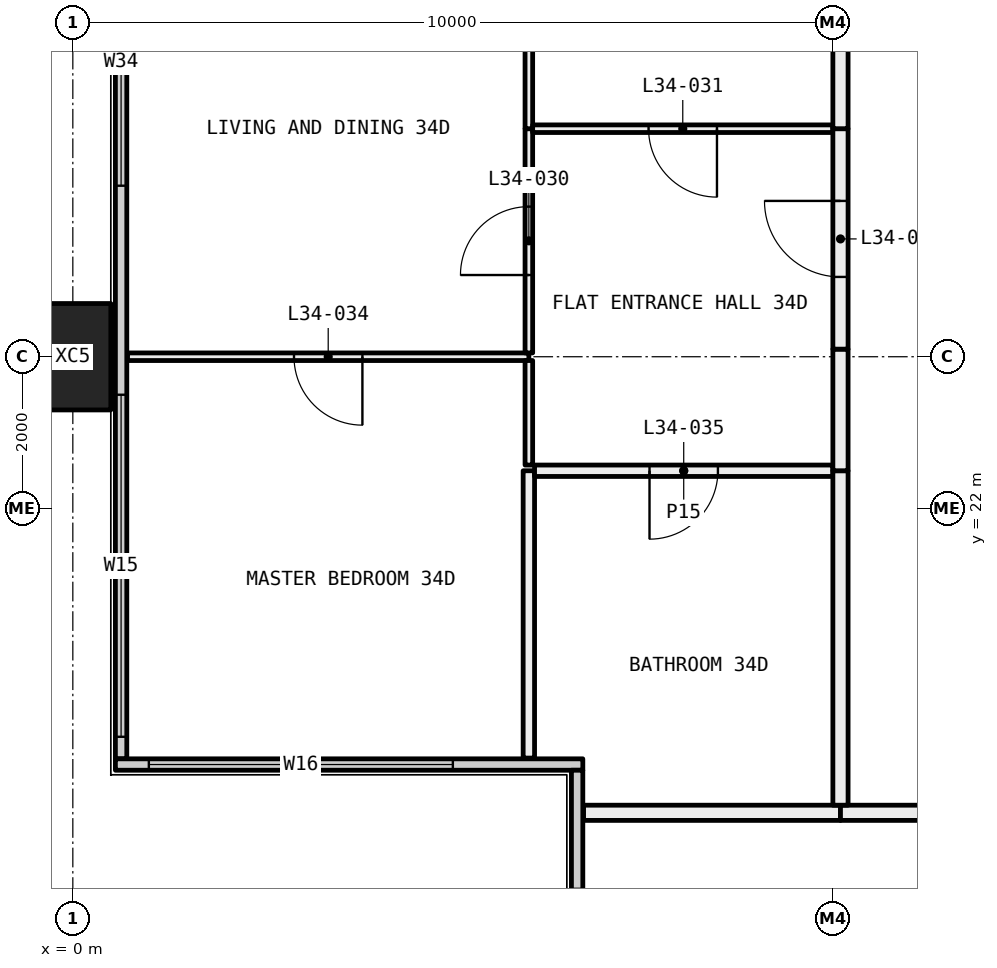
"""IFC4 building model, lengths in metres.
Left out: names, types, materials, properties, quantities, classifications, styles, units other than length and angle.
Written with IfcOpenShell. Run it as: python <this file> out.ifc"""

import sys

from ifc_helpers import new_model, si_unit, direction, frame, frame_2d, origin, origin_2d, place, context, subcontext, project, spatial, rectangle, hollow_rectangle, extrude, element, fill, save


model = new_model("IFC4")
c1 = context("Model", 3, precision=1e-05, world=origin(), true_north=direction((0.0, 1.0)))
c2 = subcontext(c1, "Body", "Model", "MODEL_VIEW")
j1 = project(units=[si_unit("LENGTHUNIT", "METRE"), si_unit("PLANEANGLEUNIT", "RADIAN")], contexts=[c1])
p1 = place(None, origin())
s1 = spatial("IfcSite", under=j1, at=p1, CompositionType="ELEMENT")
p2 = place(p1, origin())
s2 = spatial("IfcBuilding", under=s1, at=p2, CompositionType="ELEMENT")
p3 = place(p2, frame((0.0, 0.0, 131.1)))
s3 = spatial("IfcBuildingStorey", under=s2, at=p3, CompositionType="ELEMENT", Elevation=131.1)
p4 = place(p3, frame((0.0, 24.0, -0.4), z_axis=(0.0, 0.0, 1.0), x_axis=(0.0, 1.0, 0.0)))
e1 = element("IfcColumn", 1, at=p4, inside=s3, PredefinedType="COLUMN", context=c2, shape_type="SweptSolid", body=[
    extrude(hollow_rectangle(XDim=1.4, YDim=1.0, WallThickness=0.055, at=origin_2d()), origin(), (0.0, 0.0, 1.0), 3.45),
])
p5 = place(p3, frame((0.635, 18.71, 0.0), z_axis=(0.0, 0.0, 1.0), x_axis=(0.0, 1.0, 0.0)))
e2 = element("IfcWall", 2, at=p5, inside=s3, PredefinedType="ELEMENTEDWALL", context=c2, shape_type="SweptSolid", body=[
    extrude(rectangle(XDim=22.58, YDim=0.15, at=frame_2d((11.29, 0.0))), origin(), (0.0, 0.0, 1.0), 3.05),
])
p6 = place(p5, frame((0.29, 0.0, 0.45)))
e3 = element("IfcOpeningElement", 3, at=p6, cuts=e2, PredefinedType="OPENING", context=c2, shape_type="SweptSolid", body=[
    extrude(rectangle(XDim=4.5, YDim=2.55, at=frame_2d((2.25, 1.275))), frame((0.0, 0.085, 0.0), z_axis=(0.0, -1.0, 0.0), x_axis=(1.0, 0.0, 0.0)), (0.0, 0.0, 1.0), 0.17),
])
p7 = place(p5, frame((7.54, 0.0, 0.45)))
e4 = element("IfcOpeningElement", 4, at=p7, cuts=e2, PredefinedType="OPENING", context=c2, shape_type="SweptSolid", body=[
    extrude(rectangle(XDim=3.25, YDim=2.55, at=frame_2d((1.625, 1.275))), frame((0.0, 0.085, 0.0), z_axis=(0.0, -1.0, 0.0), x_axis=(1.0, 0.0, 0.0)), (0.0, 0.0, 1.0), 0.17),
])
p8 = place(p5, frame((11.79, 0.0, 0.45)))
e5 = element("IfcOpeningElement", 5, at=p8, cuts=e2, PredefinedType="OPENING", context=c2, shape_type="SweptSolid", body=[
    extrude(rectangle(XDim=2.0, YDim=2.55, at=frame_2d((1.0, 1.275))), frame((0.0, 0.085, 0.0), z_axis=(0.0, -1.0, 0.0), x_axis=(1.0, 0.0, 0.0)), (0.0, 0.0, 1.0), 0.17),
])
p9 = place(p5, frame((17.79, 0.0, 0.45)))
e6 = element("IfcOpeningElement", 6, at=p9, cuts=e2, PredefinedType="OPENING", context=c2, shape_type="SweptSolid", body=[
    extrude(rectangle(XDim=4.5, YDim=2.55, at=frame_2d((2.25, 1.275))), frame((0.0, 0.085, 0.0), z_axis=(0.0, -1.0, 0.0), x_axis=(1.0, 0.0, 0.0)), (0.0, 0.0, 1.0), 0.17),
])
p10 = place(p3, frame((0.56, 18.635, 0.0), z_axis=(0.0, 0.0, 1.0), x_axis=(1.0, 0.0, 0.0)))
e7 = element("IfcWall", 7, at=p10, inside=s3, PredefinedType="ELEMENTEDWALL", context=c2, shape_type="SweptSolid", body=[
    extrude(rectangle(XDim=6.15, YDim=0.15, at=frame_2d((3.075, 0.0))), origin(), (0.0, 0.0, 1.0), 3.05),
])
p11 = place(p10, frame((0.44, 0.0, 0.45)))
e8 = element("IfcOpeningElement", 8, at=p11, cuts=e7, PredefinedType="OPENING", context=c2, shape_type="SweptSolid", body=[
    extrude(rectangle(XDim=4.0, YDim=2.55, at=frame_2d((2.0, 1.275))), frame((0.0, 0.085, 0.0), z_axis=(0.0, -1.0, 0.0), x_axis=(1.0, 0.0, 0.0)), (0.0, 0.0, 1.0), 0.17),
])
p12 = place(p3, frame((6.635, 12.71, 0.0), z_axis=(0.0, 0.0, 1.0), x_axis=(0.0, 1.0, 0.0)))
e9 = element("IfcWall", 9, at=p12, inside=s3, PredefinedType="ELEMENTEDWALL", context=c2, shape_type="SweptSolid", body=[
    extrude(rectangle(XDim=5.85, YDim=0.15, at=frame_2d((2.925, 0.0))), origin(), (0.0, 0.0, 1.0), 3.05),
])
p13 = place(p12, frame((0.29, 0.0, 0.45)))
e10 = element("IfcOpeningElement", 10, at=p13, cuts=e9, PredefinedType="OPENING", context=c2, shape_type="SweptSolid", body=[
    extrude(rectangle(XDim=4.0, YDim=2.55, at=frame_2d((2.0, 1.275))), frame((0.0, 0.085, 0.0), z_axis=(0.0, -1.0, 0.0), x_axis=(1.0, 0.0, 0.0)), (0.0, 0.0, 1.0), 0.17),
])
p14 = place(p3, frame((10.1, 18.0, 0.0), z_axis=(0.0, 0.0, 1.0), x_axis=(-1.0, 0.0, 0.0)))
e11 = element("IfcWall", 11, at=p14, inside=s3, PredefinedType="PARTITIONING", context=c2, shape_type="SweptSolid", body=[
    extrude(rectangle(XDim=3.38, YDim=0.2, at=frame_2d((1.69, 0.0))), origin(), (0.0, 0.0, 1.0), 3.05),
])
p15 = place(p3, frame((12.0, 18.0, 0.0), z_axis=(0.0, 0.0, 1.0), x_axis=(-1.0, 0.0, 0.0)))
e12 = element("IfcWall", 12, at=p15, inside=s3, PredefinedType="PARTITIONING", context=c2, shape_type="SweptSolid", body=[
    extrude(rectangle(XDim=1.9, YDim=0.2, at=frame_2d((0.95, 0.0))), origin(), (0.0, 0.0, 1.0), 3.05),
])
p16 = place(p3, frame((6.0, 24.0, 0.0), z_axis=(0.0, 0.0, 1.0), x_axis=(-1.0, 0.0, 0.0)))
e13 = element("IfcWall", 13, at=p16, inside=s3, PredefinedType="PARTITIONING", context=c2, shape_type="SweptSolid", body=[
    extrude(rectangle(XDim=5.28, YDim=0.1, at=frame_2d((2.64, 0.0))), origin(), (0.0, 0.0, 1.0), 2.45),
])
p17 = place(p16, frame((2.19, 0.0, 0.0)))
e14 = element("IfcOpeningElement", 14, at=p17, cuts=e13, PredefinedType="OPENING", context=c2, shape_type="SweptSolid", body=[
    extrude(rectangle(XDim=0.9, YDim=2.1, at=frame_2d((0.45, 1.05))), frame((0.0, 0.06, 0.0), z_axis=(0.0, -1.0, 0.0), x_axis=(1.0, 0.0, 0.0)), (0.0, 0.0, 1.0), 0.12),
])
p18 = place(p3, frame((6.0, 18.72, 0.0), z_axis=(0.0, 0.0, 1.0), x_axis=(0.0, 1.0, 0.0)))
e15 = element("IfcWall", 15, at=p18, inside=s3, PredefinedType="PARTITIONING", context=c2, shape_type="SweptSolid", body=[
    extrude(rectangle(XDim=3.78, YDim=0.15, at=frame_2d((1.89, 0.0))), origin(), (0.0, 0.0, 1.0), 3.05),
])
p19 = place(p3, frame((6.0, 22.575, 0.0), z_axis=(0.0, 0.0, 1.0), x_axis=(0.0, 1.0, 0.0)))
e16 = element("IfcWall", 16, at=p19, inside=s3, PredefinedType="PARTITIONING", context=c2, shape_type="SweptSolid", body=[
    extrude(rectangle(XDim=1.375, YDim=0.1, at=frame_2d((0.688, 0.0))), origin(), (0.0, 0.0, 1.0), 2.45),
])
p20 = place(p3, frame((6.0, 24.05, 0.0), z_axis=(0.0, 0.0, 1.0), x_axis=(0.0, 1.0, 0.0)))
e17 = element("IfcWall", 17, at=p20, inside=s3, PredefinedType="PARTITIONING", context=c2, shape_type="SweptSolid", body=[
    extrude(rectangle(XDim=2.95, YDim=0.1, at=frame_2d((1.475, 0.0))), origin(), (0.0, 0.0, 1.0), 2.45),
])
p21 = place(p20, frame((1.025, 0.0, 0.0)))
e18 = element("IfcOpeningElement", 18, at=p21, cuts=e17, PredefinedType="OPENING", context=c2, shape_type="SweptSolid", body=[
    extrude(rectangle(XDim=0.9, YDim=2.1, at=frame_2d((0.45, 1.05))), frame((0.0, 0.06, 0.0), z_axis=(0.0, -1.0, 0.0), x_axis=(1.0, 0.0, 0.0)), (0.0, 0.0, 1.0), 0.12),
])
p22 = place(p3, frame((6.0, 27.0, 0.0), z_axis=(0.0, 0.0, 1.0), x_axis=(0.0, 1.0, 0.0)))
e19 = element("IfcWall", 19, at=p22, inside=s3, PredefinedType="PARTITIONING", context=c2, shape_type="SweptSolid", body=[
    extrude(rectangle(XDim=2.95, YDim=0.1, at=frame_2d((1.475, 0.0))), origin(), (0.0, 0.0, 1.0), 3.05),
])
p23 = place(p3, frame((10.0, 22.5, 0.0), z_axis=(0.0, 0.0, 1.0), x_axis=(-1.0, 0.0, 0.0)))
e20 = element("IfcWall", 20, at=p23, inside=s3, PredefinedType="PARTITIONING", context=c2, shape_type="SweptSolid", body=[
    extrude(rectangle(XDim=3.925, YDim=0.15, at=frame_2d((1.962, 0.0))), origin(), (0.0, 0.0, 1.0), 3.05),
])
p24 = place(p23, frame((1.512, 0.0, 0.0)))
e21 = element("IfcOpeningElement", 21, at=p24, cuts=e20, PredefinedType="OPENING", context=c2, shape_type="SweptSolid", body=[
    extrude(rectangle(XDim=0.9, YDim=2.1, at=frame_2d((0.45, 1.05))), frame((0.0, 0.085, 0.0), z_axis=(0.0, -1.0, 0.0), x_axis=(1.0, 0.0, 0.0)), (0.0, 0.0, 1.0), 0.17),
])
p25 = place(p3, frame((10.1, 18.1, 0.0), z_axis=(0.0, 0.0, 1.0), x_axis=(0.0, 1.0, 0.0)))
e22 = element("IfcWall", 22, at=p25, inside=s3, PredefinedType="PARTITIONING", context=c2, shape_type="SweptSolid", body=[
    extrude(rectangle(XDim=4.4, YDim=0.2, at=frame_2d((2.2, 0.0))), origin(), (0.0, 0.0, 1.0), 3.05),
])
p26 = place(p3, frame((10.0, 27.0, 0.0), z_axis=(0.0, 0.0, 1.0), x_axis=(-1.0, 0.0, 0.0)))
e23 = element("IfcWall", 23, at=p26, inside=s3, PredefinedType="PARTITIONING", context=c2, shape_type="SweptSolid", body=[
    extrude(rectangle(XDim=3.95, YDim=0.1, at=frame_2d((1.975, 0.0))), origin(), (0.0, 0.0, 1.0), 3.05),
])
p27 = place(p26, frame((1.525, 0.0, 0.0)))
e24 = element("IfcOpeningElement", 24, at=p27, cuts=e23, PredefinedType="OPENING", context=c2, shape_type="SweptSolid", body=[
    extrude(rectangle(XDim=0.9, YDim=2.1, at=frame_2d((0.45, 1.05))), frame((0.0, 0.06, 0.0), z_axis=(0.0, -1.0, 0.0), x_axis=(1.0, 0.0, 0.0)), (0.0, 0.0, 1.0), 0.12),
])
p28 = place(p3, frame((10.1, 22.5, 0.0), z_axis=(0.0, 0.0, 1.0), x_axis=(0.0, 1.0, 0.0)))
e25 = element("IfcWall", 25, at=p28, inside=s3, PredefinedType="PARTITIONING", context=c2, shape_type="SweptSolid", body=[
    extrude(rectangle(XDim=1.6, YDim=0.2, at=frame_2d((0.8, 0.0))), origin(), (0.0, 0.0, 1.0), 2.45),
])
p29 = place(p3, frame((10.1, 24.1, 0.0), z_axis=(0.0, 0.0, 1.0), x_axis=(0.0, 1.0, 0.0)))
e26 = element("IfcWall", 26, at=p29, inside=s3, PredefinedType="PARTITIONING", context=c2, shape_type="SweptSolid", body=[
    extrude(rectangle(XDim=2.9, YDim=0.2, at=frame_2d((1.45, 0.0))), origin(), (0.0, 0.0, 1.0), 3.05),
])
p30 = place(p29, frame((0.95, 0.0, 0.0)))
e27 = element("IfcOpeningElement", 27, at=p30, cuts=e26, PredefinedType="OPENING", context=c2, shape_type="SweptSolid", body=[
    extrude(rectangle(XDim=1.0, YDim=2.1, at=frame_2d((0.5, 1.05))), frame((0.0, 0.11, 0.0), z_axis=(0.0, -1.0, 0.0), x_axis=(1.0, 0.0, 0.0)), (0.0, 0.0, 1.0), 0.22),
])
p31 = place(p3, frame((10.1, 27.0, 0.0), z_axis=(0.0, 0.0, 1.0), x_axis=(0.0, 1.0, 0.0)))
e28 = element("IfcWall", 28, at=p31, inside=s3, PredefinedType="PARTITIONING", context=c2, shape_type="SweptSolid", body=[
    extrude(rectangle(XDim=9.1, YDim=0.2, at=frame_2d((4.55, 0.0))), origin(), (0.0, 0.0, 1.0), 2.45),
])
p32 = place(p6, origin())
e29 = element("IfcWindow", 29, at=p32, inside=s3, PartitioningType="SINGLE_PANEL", PredefinedType="WINDOW", context=c2, shape_type="SweptSolid", body=[
    extrude(rectangle(XDim=4.5, YDim=2.55, at=frame_2d((2.25, 1.275))), frame((0.0, 0.03, 0.0), z_axis=(0.0, -1.0, 0.0), x_axis=(1.0, 0.0, 0.0)), (0.0, 0.0, 1.0), 0.06),
])
fill(e3, e29)
p33 = place(p7, origin())
e30 = element("IfcWindow", 30, at=p33, inside=s3, PartitioningType="SINGLE_PANEL", PredefinedType="WINDOW", context=c2, shape_type="SweptSolid", body=[
    extrude(rectangle(XDim=3.25, YDim=2.55, at=frame_2d((1.625, 1.275))), frame((0.0, 0.03, 0.0), z_axis=(0.0, -1.0, 0.0), x_axis=(1.0, 0.0, 0.0)), (0.0, 0.0, 1.0), 0.06),
])
fill(e4, e30)
p34 = place(p11, origin())
e31 = element("IfcWindow", 31, at=p34, inside=s3, PartitioningType="SINGLE_PANEL", PredefinedType="WINDOW", context=c2, shape_type="SweptSolid", body=[
    extrude(rectangle(XDim=4.0, YDim=2.55, at=frame_2d((2.0, 1.275))), frame((0.0, 0.03, 0.0), z_axis=(0.0, -1.0, 0.0), x_axis=(1.0, 0.0, 0.0)), (0.0, 0.0, 1.0), 0.06),
])
fill(e8, e31)
p35 = place(p30, origin())
e32 = element("IfcDoor", 32, at=p35, inside=s3, OperationType="SINGLE_SWING_LEFT", PredefinedType="DOOR", context=c2, shape_type="SweptSolid", body=[
    extrude(rectangle(XDim=1.0, YDim=2.1, at=frame_2d((0.5, 1.05))), frame((0.0, 0.025, 0.0), z_axis=(0.0, -1.0, 0.0), x_axis=(1.0, 0.0, 0.0)), (0.0, 0.0, 1.0), 0.05),
])
fill(e27, e32)
p36 = place(p21, origin())
e33 = element("IfcDoor", 33, at=p36, inside=s3, OperationType="SINGLE_SWING_RIGHT", PredefinedType="DOOR", context=c2, shape_type="SweptSolid", body=[
    extrude(rectangle(XDim=0.9, YDim=2.1, at=frame_2d((0.45, 1.05))), frame((0.0, 0.025, 0.0), z_axis=(0.0, -1.0, 0.0), x_axis=(1.0, 0.0, 0.0)), (0.0, 0.0, 1.0), 0.05),
])
fill(e18, e33)
p37 = place(p27, origin())
e34 = element("IfcDoor", 34, at=p37, inside=s3, OperationType="SINGLE_SWING_RIGHT", PredefinedType="DOOR", context=c2, shape_type="SweptSolid", body=[
    extrude(rectangle(XDim=0.9, YDim=2.1, at=frame_2d((0.45, 1.05))), frame((0.0, 0.025, 0.0), z_axis=(0.0, -1.0, 0.0), x_axis=(1.0, 0.0, 0.0)), (0.0, 0.0, 1.0), 0.05),
])
fill(e24, e34)
p38 = place(p17, origin())
e35 = element("IfcDoor", 35, at=p38, inside=s3, OperationType="SINGLE_SWING_RIGHT", PredefinedType="DOOR", context=c2, shape_type="SweptSolid", body=[
    extrude(rectangle(XDim=0.9, YDim=2.1, at=frame_2d((0.45, 1.05))), frame((0.0, 0.025, 0.0), z_axis=(0.0, -1.0, 0.0), x_axis=(1.0, 0.0, 0.0)), (0.0, 0.0, 1.0), 0.05),
])
fill(e14, e35)
p39 = place(p24, origin())
e36 = element("IfcDoor", 36, at=p39, inside=s3, OperationType="SINGLE_SWING_LEFT", PredefinedType="DOOR", context=c2, shape_type="SweptSolid", body=[
    extrude(rectangle(XDim=0.9, YDim=2.1, at=frame_2d((0.45, 1.05))), frame((0.0, 0.025, 0.0), z_axis=(0.0, -1.0, 0.0), x_axis=(1.0, 0.0, 0.0)), (0.0, 0.0, 1.0), 0.05),
])
fill(e21, e36)
save(model, sys.argv[1])
